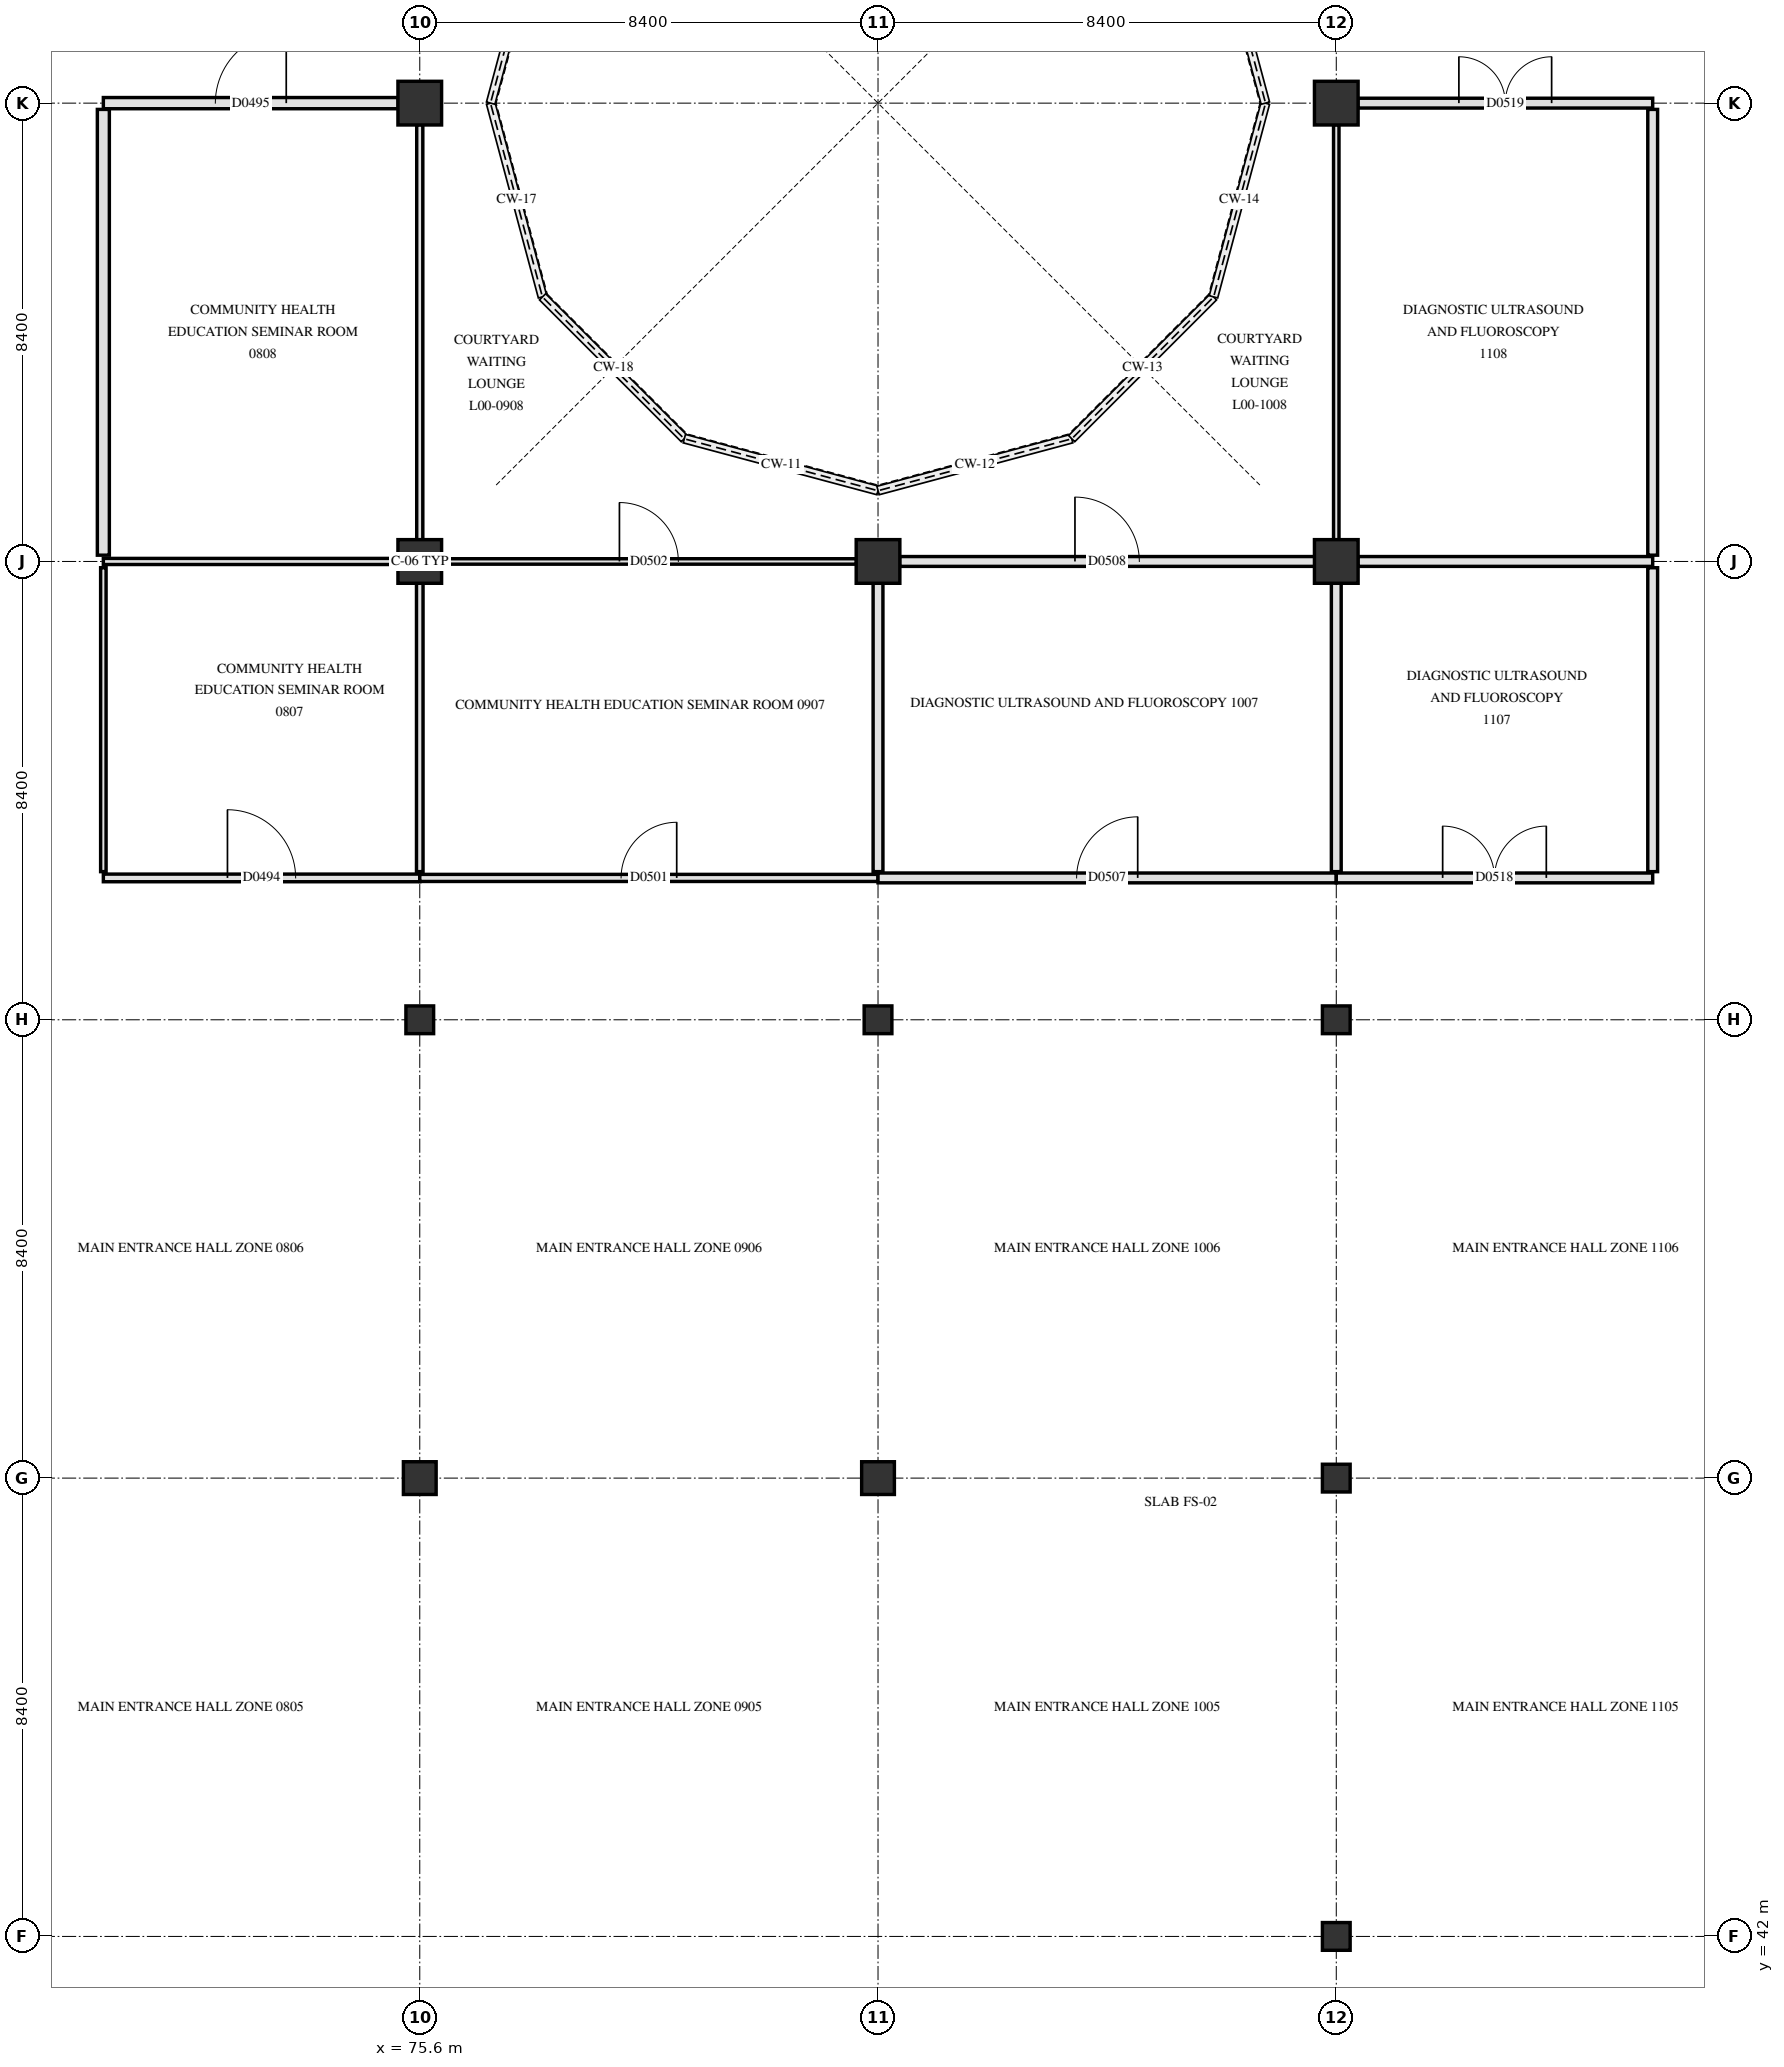
"""IFC4 building model, lengths in metres.
Left out: names, types, materials, properties, quantities, classifications, styles, units other than length and angle.
Written with IfcOpenShell. Run it as: python <this file> out.ifc"""

import sys

from ifc_helpers import new_model, si_unit, direction, frame, frame_2d, origin, origin_2d, place, context, subcontext, project, spatial, rectangle, circle, hollow_circle, extrude, element, fill, save


model = new_model("IFC4")
c1 = context("Model", 3, precision=1e-05, world=origin(), true_north=direction((0.0, 1.0)))
c2 = subcontext(c1, "Body", "Model", "MODEL_VIEW")
j1 = project(units=[si_unit("LENGTHUNIT", "METRE"), si_unit("PLANEANGLEUNIT", "RADIAN")], contexts=[c1])
p1 = place(None, origin())
s1 = spatial("IfcSite", under=j1, at=p1, CompositionType="ELEMENT")
p2 = place(p1, origin())
s2 = spatial("IfcBuilding", under=s1, at=p2, CompositionType="ELEMENT")
p3 = place(p2, origin())
s3 = spatial("IfcBuildingStorey", under=s2, at=p3, CompositionType="ELEMENT", Elevation=0.0)
p4 = place(p3, frame((75.6, 50.4, 0.0), z_axis=(0.0, 0.0, 1.0), x_axis=(1.0, 0.0, 0.0)))
e1 = element("IfcColumn", 1, at=p4, inside=s3, PredefinedType="COLUMN", context=c2, shape_type="SweptSolid", body=[
    extrude(rectangle(XDim=0.6, YDim=0.6, at=origin_2d()), origin(), (0.0, 0.0, 1.0), 4.8),
])
p5 = place(p3, frame((75.6, 58.8, 0.0), z_axis=(0.0, 0.0, 1.0), x_axis=(1.0, 0.0, 0.0)))
e2 = element("IfcColumn", 2, at=p5, inside=s3, PredefinedType="COLUMN", context=c2, shape_type="SweptSolid", body=[
    extrude(hollow_circle(Radius=0.254, WallThickness=0.02, at=origin_2d()), origin(), (0.0, 0.0, 1.0), 4.8),
])
for number, where, z_axis, x_axis in (
    (3, (75.6, 67.2, 0.0), (0.0, 0.0, 1.0), (1.0, 0.0, 0.0)),
    (4, (75.6, 75.6, 0.0), (0.0, 0.0, 1.0), (1.0, 0.0, 0.0)),
):
    element("IfcColumn", number, at=place(p3, frame(where, z_axis=z_axis, x_axis=x_axis)), inside=s3, PredefinedType="COLUMN", context=c2, shape_type="SweptSolid", body=[
        extrude(circle(Radius=0.4, at=origin_2d()), origin(), (0.0, 0.0, 1.0), 4.8),
    ])
p6 = place(p3, frame((84.0, 50.4, 0.0), z_axis=(0.0, 0.0, 1.0), x_axis=(1.0, 0.0, 0.0)))
e5 = element("IfcColumn", 5, at=p6, inside=s3, PredefinedType="COLUMN", context=c2, shape_type="SweptSolid", body=[
    extrude(rectangle(XDim=0.6, YDim=0.6, at=origin_2d()), origin(), (0.0, 0.0, 1.0), 4.8),
])
p7 = place(p3, frame((84.0, 58.8, 0.0), z_axis=(0.0, 0.0, 1.0), x_axis=(1.0, 0.0, 0.0)))
e6 = element("IfcColumn", 6, at=p7, inside=s3, PredefinedType="COLUMN", context=c2, shape_type="SweptSolid", body=[
    extrude(hollow_circle(Radius=0.254, WallThickness=0.02, at=origin_2d()), origin(), (0.0, 0.0, 1.0), 4.8),
])
p8 = place(p3, frame((84.0, 67.2, 0.0), z_axis=(0.0, 0.0, 1.0), x_axis=(1.0, 0.0, 0.0)))
e7 = element("IfcColumn", 7, at=p8, inside=s3, PredefinedType="COLUMN", context=c2, shape_type="SweptSolid", body=[
    extrude(circle(Radius=0.4, at=origin_2d()), origin(), (0.0, 0.0, 1.0), 4.8),
])
for number, where, z_axis, x_axis in (
    (8, (92.4, 42.0, 0.0), (0.0, 0.0, 1.0), (1.0, 0.0, 0.0)),
    (9, (92.4, 50.4, 0.0), (0.0, 0.0, 1.0), (1.0, 0.0, 0.0)),
    (10, (92.4, 58.8, 0.0), (0.0, 0.0, 1.0), (1.0, 0.0, 0.0)),
):
    element("IfcColumn", number, at=place(p3, frame(where, z_axis=z_axis, x_axis=x_axis)), inside=s3, PredefinedType="COLUMN", context=c2, shape_type="SweptSolid", body=[
        extrude(hollow_circle(Radius=0.254, WallThickness=0.02, at=origin_2d()), origin(), (0.0, 0.0, 1.0), 4.8),
    ])
for number, where, z_axis, x_axis in (
    (11, (92.4, 67.2, 0.0), (0.0, 0.0, 1.0), (1.0, 0.0, 0.0)),
    (12, (92.4, 75.6, 0.0), (0.0, 0.0, 1.0), (1.0, 0.0, 0.0)),
):
    element("IfcColumn", number, at=place(p3, frame(where, z_axis=z_axis, x_axis=x_axis)), inside=s3, PredefinedType="COLUMN", context=c2, shape_type="SweptSolid", body=[
        extrude(circle(Radius=0.4, at=origin_2d()), origin(), (0.0, 0.0, 1.0), 4.8),
    ])
p9 = place(p3, frame((69.8, 61.4, 0.0), z_axis=(0.0, 0.0, 1.0), x_axis=(1.0, 0.0, 0.0)))
e13 = element("IfcWall", 13, at=p9, inside=s3, PredefinedType="PARTITIONING", context=c2, shape_type="SweptSolid", body=[
    extrude(rectangle(XDim=5.8, YDim=0.14, at=frame_2d((2.9, 0.0))), origin(), (0.0, 0.0, 1.0), 3.89),
])
p10 = place(p9, frame((2.275, 0.0, 0.0)))
e14 = element("IfcOpeningElement", 14, at=p10, cuts=e13, PredefinedType="OPENING", context=c2, shape_type="SweptSolid", body=[
    extrude(rectangle(XDim=1.25, YDim=2.2, at=frame_2d((0.625, 1.1))), frame((0.0, 0.08, 0.0), z_axis=(0.0, -1.0, 0.0), x_axis=(1.0, 0.0, 0.0)), (0.0, 0.0, 1.0), 0.16),
])
p11 = place(p3, frame((75.6, 61.4, 0.0), z_axis=(0.0, 0.0, 1.0), x_axis=(1.0, 0.0, 0.0)))
e15 = element("IfcWall", 15, at=p11, inside=s3, PredefinedType="PARTITIONING", context=c2, shape_type="SweptSolid", body=[
    extrude(rectangle(XDim=8.4, YDim=0.13, at=frame_2d((4.2, 0.0))), origin(), (0.0, 0.0, 1.0), 3.89),
])
p12 = place(p11, frame((3.69, 0.0, 0.0)))
e16 = element("IfcOpeningElement", 16, at=p12, cuts=e15, PredefinedType="OPENING", context=c2, shape_type="SweptSolid", body=[
    extrude(rectangle(XDim=1.02, YDim=2.12, at=frame_2d((0.51, 1.06))), frame((0.0, 0.075, 0.0), z_axis=(0.0, -1.0, 0.0), x_axis=(1.0, 0.0, 0.0)), (0.0, 0.0, 1.0), 0.15),
])
p13 = place(p3, frame((84.0, 61.4, 0.0), z_axis=(0.0, 0.0, 1.0), x_axis=(1.0, 0.0, 0.0)))
e17 = element("IfcWall", 17, at=p13, inside=s3, PredefinedType="PARTITIONING", context=c2, shape_type="SweptSolid", body=[
    extrude(rectangle(XDim=8.4, YDim=0.18, at=frame_2d((4.2, 0.0))), origin(), (0.0, 0.0, 1.0), 3.89),
])
p14 = place(p13, frame((3.64, 0.0, 0.0)))
e18 = element("IfcOpeningElement", 18, at=p14, cuts=e17, PredefinedType="OPENING", context=c2, shape_type="SweptSolid", body=[
    extrude(rectangle(XDim=1.12, YDim=2.18, at=frame_2d((0.56, 1.09))), frame((0.0, 0.1, 0.0), z_axis=(0.0, -1.0, 0.0), x_axis=(1.0, 0.0, 0.0)), (0.0, 0.0, 1.0), 0.2),
])
p15 = place(p3, frame((92.4, 61.4, 0.0), z_axis=(0.0, 0.0, 1.0), x_axis=(1.0, 0.0, 0.0)))
e19 = element("IfcWall", 19, at=p15, inside=s3, PredefinedType="PARTITIONING", context=c2, shape_type="SweptSolid", body=[
    extrude(rectangle(XDim=5.8, YDim=0.18, at=frame_2d((2.9, 0.0))), origin(), (0.0, 0.0, 1.0), 3.89),
])
p16 = place(p15, frame((1.95, 0.0, 0.0)))
e20 = element("IfcOpeningElement", 20, at=p16, cuts=e19, PredefinedType="OPENING", context=c2, shape_type="SweptSolid", body=[
    extrude(rectangle(XDim=1.9, YDim=2.3, at=frame_2d((0.95, 1.15))), frame((0.0, 0.1, 0.0), z_axis=(0.0, -1.0, 0.0), x_axis=(1.0, 0.0, 0.0)), (0.0, 0.0, 1.0), 0.2),
])
p17 = place(p3, frame((69.8, 67.2, 0.0), z_axis=(0.0, 0.0, 1.0), x_axis=(1.0, 0.0, 0.0)))
e21 = element("IfcWall", 21, at=p17, inside=s3, PredefinedType="PARTITIONING", context=c2, shape_type="SweptSolid", body=[
    extrude(rectangle(XDim=5.405, YDim=0.112, at=frame_2d((2.703, 0.0))), origin(), (0.0, 0.0, 1.0), 3.84),
])
p18 = place(p3, frame((75.995, 67.2, 0.0), z_axis=(0.0, 0.0, 1.0), x_axis=(1.0, 0.0, 0.0)))
e22 = element("IfcWall", 22, at=p18, inside=s3, PredefinedType="PARTITIONING", context=c2, shape_type="SweptSolid", body=[
    extrude(rectangle(XDim=7.61, YDim=0.1, at=frame_2d((3.805, 0.0))), origin(), (0.0, 0.0, 1.0), 3.84),
])
p19 = place(p18, frame((3.265, 0.0, 0.0)))
e23 = element("IfcOpeningElement", 23, at=p19, cuts=e22, PredefinedType="OPENING", context=c2, shape_type="SweptSolid", body=[
    extrude(rectangle(XDim=1.08, YDim=2.12, at=frame_2d((0.54, 1.06))), frame((0.0, 0.06, 0.0), z_axis=(0.0, -1.0, 0.0), x_axis=(1.0, 0.0, 0.0)), (0.0, 0.0, 1.0), 0.12),
])
p20 = place(p3, frame((84.395, 67.2, 0.0), z_axis=(0.0, 0.0, 1.0), x_axis=(1.0, 0.0, 0.0)))
e24 = element("IfcWall", 24, at=p20, inside=s3, PredefinedType="PARTITIONING", context=c2, shape_type="SweptSolid", body=[
    extrude(rectangle(XDim=7.61, YDim=0.18, at=frame_2d((3.805, 0.0))), origin(), (0.0, 0.0, 1.0), 3.84),
])
p21 = place(p20, frame((3.215, 0.0, 0.0)))
e25 = element("IfcOpeningElement", 25, at=p21, cuts=e24, PredefinedType="OPENING", context=c2, shape_type="SweptSolid", body=[
    extrude(rectangle(XDim=1.18, YDim=2.18, at=frame_2d((0.59, 1.09))), frame((0.0, 0.1, 0.0), z_axis=(0.0, -1.0, 0.0), x_axis=(1.0, 0.0, 0.0)), (0.0, 0.0, 1.0), 0.2),
])
p22 = place(p3, frame((92.795, 67.2, 0.0), z_axis=(0.0, 0.0, 1.0), x_axis=(1.0, 0.0, 0.0)))
e26 = element("IfcWall", 26, at=p22, inside=s3, PredefinedType="PARTITIONING", context=c2, shape_type="SweptSolid", body=[
    extrude(rectangle(XDim=5.405, YDim=0.18, at=frame_2d((2.703, 0.0))), origin(), (0.0, 0.0, 1.0), 3.84),
])
p23 = place(p3, frame((69.8, 75.6, 0.0), z_axis=(0.0, 0.0, 1.0), x_axis=(1.0, 0.0, 0.0)))
e27 = element("IfcWall", 27, at=p23, inside=s3, PredefinedType="PARTITIONING", context=c2, shape_type="SweptSolid", body=[
    extrude(rectangle(XDim=5.405, YDim=0.205, at=frame_2d((2.703, 0.0))), origin(), (0.0, 0.0, 1.0), 3.84),
])
p24 = place(p23, frame((2.052, 0.0, 0.0)))
e28 = element("IfcOpeningElement", 28, at=p24, cuts=e27, PredefinedType="OPENING", context=c2, shape_type="SweptSolid", body=[
    extrude(rectangle(XDim=1.3, YDim=2.2, at=frame_2d((0.65, 1.1))), frame((0.0, 0.113, 0.0), z_axis=(0.0, -1.0, 0.0), x_axis=(1.0, 0.0, 0.0)), (0.0, 0.0, 1.0), 0.225),
])
p25 = place(p3, frame((92.795, 75.6, 0.0), z_axis=(0.0, 0.0, 1.0), x_axis=(1.0, 0.0, 0.0)))
e29 = element("IfcWall", 29, at=p25, inside=s3, PredefinedType="PARTITIONING", context=c2, shape_type="SweptSolid", body=[
    extrude(rectangle(XDim=5.405, YDim=0.18, at=frame_2d((2.703, 0.0))), origin(), (0.0, 0.0, 1.0), 3.84),
])
p26 = place(p25, frame((1.853, 0.0, 0.0)))
e30 = element("IfcOpeningElement", 30, at=p26, cuts=e29, PredefinedType="OPENING", context=c2, shape_type="SweptSolid", body=[
    extrude(rectangle(XDim=1.7, YDim=2.25, at=frame_2d((0.85, 1.125))), frame((0.0, 0.1, 0.0), z_axis=(0.0, -1.0, 0.0), x_axis=(1.0, 0.0, 0.0)), (0.0, 0.0, 1.0), 0.2),
])
p27 = place(p3, frame((69.8, 61.515, 0.0), z_axis=(0.0, 0.0, 1.0), x_axis=(0.0, 1.0, 0.0)))
e31 = element("IfcWall", 31, at=p27, inside=s3, PredefinedType="PARTITIONING", context=c2, shape_type="SweptSolid", body=[
    extrude(rectangle(XDim=5.57, YDim=0.1, at=frame_2d((2.785, 0.0))), origin(), (0.0, 0.0, 1.0), 3.84),
])
p28 = place(p3, frame((69.8, 67.315, 0.0), z_axis=(0.0, 0.0, 1.0), x_axis=(0.0, 1.0, 0.0)))
e32 = element("IfcWall", 32, at=p28, inside=s3, PredefinedType="PARTITIONING", context=c2, shape_type="SweptSolid", body=[
    extrude(rectangle(XDim=8.17, YDim=0.22, at=frame_2d((4.085, 0.0))), origin(), (0.0, 0.0, 1.0), 3.84),
])
p29 = place(p3, frame((75.6, 61.515, 0.0), z_axis=(0.0, 0.0, 1.0), x_axis=(0.0, 1.0, 0.0)))
e33 = element("IfcWall", 33, at=p29, inside=s3, PredefinedType="PARTITIONING", context=c2, shape_type="SweptSolid", body=[
    extrude(rectangle(XDim=5.29, YDim=0.12, at=frame_2d((2.645, 0.0))), origin(), (0.0, 0.0, 1.0), 3.89),
])
p30 = place(p3, frame((75.6, 67.595, 0.0), z_axis=(0.0, 0.0, 1.0), x_axis=(0.0, 1.0, 0.0)))
e34 = element("IfcWall", 34, at=p30, inside=s3, PredefinedType="PARTITIONING", context=c2, shape_type="SweptSolid", body=[
    extrude(rectangle(XDim=7.61, YDim=0.112, at=frame_2d((3.805, 0.0))), origin(), (0.0, 0.0, 1.0), 3.89),
])
for number, where, z_axis, x_axis in (
    (35, (84.0, 61.515, 0.0), (0.0, 0.0, 1.0), (0.0, 1.0, 0.0)),
    (36, (92.4, 61.515, 0.0), (0.0, 0.0, 1.0), (0.0, 1.0, 0.0)),
):
    element("IfcWall", number, at=place(p3, frame(where, z_axis=z_axis, x_axis=x_axis)), inside=s3, PredefinedType="PARTITIONING", context=c2, shape_type="SweptSolid", body=[
        extrude(rectangle(XDim=5.29, YDim=0.18, at=frame_2d((2.645, 0.0))), origin(), (0.0, 0.0, 1.0), 3.89),
    ])
p31 = place(p3, frame((92.4, 67.595, 0.0), z_axis=(0.0, 0.0, 1.0), x_axis=(0.0, 1.0, 0.0)))
e37 = element("IfcWall", 37, at=p31, inside=s3, PredefinedType="PARTITIONING", context=c2, shape_type="SweptSolid", body=[
    extrude(rectangle(XDim=7.61, YDim=0.1, at=frame_2d((3.805, 0.0))), origin(), (0.0, 0.0, 1.0), 3.89),
])
p32 = place(p3, frame((98.2, 61.515, 0.0), z_axis=(0.0, 0.0, 1.0), x_axis=(0.0, 1.0, 0.0)))
e38 = element("IfcWall", 38, at=p32, inside=s3, PredefinedType="PARTITIONING", context=c2, shape_type="SweptSolid", body=[
    extrude(rectangle(XDim=5.57, YDim=0.18, at=frame_2d((2.785, 0.0))), origin(), (0.0, 0.0, 1.0), 3.84),
])
p33 = place(p3, frame((98.2, 67.315, 0.0), z_axis=(0.0, 0.0, 1.0), x_axis=(0.0, 1.0, 0.0)))
e39 = element("IfcWall", 39, at=p33, inside=s3, PredefinedType="PARTITIONING", context=c2, shape_type="SweptSolid", body=[
    extrude(rectangle(XDim=8.17, YDim=0.18, at=frame_2d((4.085, 0.0))), origin(), (0.0, 0.0, 1.0), 3.84),
])
p34 = place(p10, origin())
e40 = element("IfcDoor", 40, at=p34, inside=s3, OperationType="SINGLE_SWING_LEFT", PredefinedType="DOOR", context=c2, shape_type="SweptSolid", body=[
    extrude(rectangle(XDim=1.25, YDim=2.2, at=frame_2d((0.625, 1.1))), frame((0.0, 0.025, 0.0), z_axis=(0.0, -1.0, 0.0), x_axis=(1.0, 0.0, 0.0)), (0.0, 0.0, 1.0), 0.05),
])
fill(e14, e40)
p35 = place(p24, origin())
e41 = element("IfcDoor", 41, at=p35, inside=s3, OperationType="SINGLE_SWING_RIGHT", PredefinedType="DOOR", context=c2, shape_type="SweptSolid", body=[
    extrude(rectangle(XDim=1.3, YDim=2.2, at=frame_2d((0.65, 1.1))), frame((0.0, 0.025, 0.0), z_axis=(0.0, -1.0, 0.0), x_axis=(1.0, 0.0, 0.0)), (0.0, 0.0, 1.0), 0.05),
])
fill(e28, e41)
p36 = place(p12, origin())
e42 = element("IfcDoor", 42, at=p36, inside=s3, OperationType="SINGLE_SWING_RIGHT", PredefinedType="DOOR", context=c2, shape_type="SweptSolid", body=[
    extrude(rectangle(XDim=1.02, YDim=2.12, at=frame_2d((0.51, 1.06))), frame((0.0, 0.025, 0.0), z_axis=(0.0, -1.0, 0.0), x_axis=(1.0, 0.0, 0.0)), (0.0, 0.0, 1.0), 0.05),
])
fill(e16, e42)
p37 = place(p19, origin())
e43 = element("IfcDoor", 43, at=p37, inside=s3, OperationType="SINGLE_SWING_LEFT", PredefinedType="DOOR", context=c2, shape_type="SweptSolid", body=[
    extrude(rectangle(XDim=1.08, YDim=2.12, at=frame_2d((0.54, 1.06))), frame((0.0, 0.025, 0.0), z_axis=(0.0, -1.0, 0.0), x_axis=(1.0, 0.0, 0.0)), (0.0, 0.0, 1.0), 0.05),
])
fill(e23, e43)
p38 = place(p14, origin())
e44 = element("IfcDoor", 44, at=p38, inside=s3, OperationType="SINGLE_SWING_RIGHT", PredefinedType="DOOR", context=c2, shape_type="SweptSolid", body=[
    extrude(rectangle(XDim=1.12, YDim=2.18, at=frame_2d((0.56, 1.09))), frame((0.0, 0.025, 0.0), z_axis=(0.0, -1.0, 0.0), x_axis=(1.0, 0.0, 0.0)), (0.0, 0.0, 1.0), 0.05),
])
fill(e18, e44)
p39 = place(p21, origin())
e45 = element("IfcDoor", 45, at=p39, inside=s3, OperationType="SINGLE_SWING_LEFT", PredefinedType="DOOR", context=c2, shape_type="SweptSolid", body=[
    extrude(rectangle(XDim=1.18, YDim=2.18, at=frame_2d((0.59, 1.09))), frame((0.0, 0.025, 0.0), z_axis=(0.0, -1.0, 0.0), x_axis=(1.0, 0.0, 0.0)), (0.0, 0.0, 1.0), 0.05),
])
fill(e25, e45)
p40 = place(p16, origin())
e46 = element("IfcDoor", 46, at=p40, inside=s3, OperationType="DOUBLE_SWING_LEFT", PredefinedType="DOOR", context=c2, shape_type="SweptSolid", body=[
    extrude(rectangle(XDim=1.9, YDim=2.3, at=frame_2d((0.95, 1.15))), frame((0.0, 0.025, 0.0), z_axis=(0.0, -1.0, 0.0), x_axis=(1.0, 0.0, 0.0)), (0.0, 0.0, 1.0), 0.05),
])
fill(e20, e46)
p41 = place(p26, origin())
e47 = element("IfcDoor", 47, at=p41, inside=s3, OperationType="DOUBLE_SWING_RIGHT", PredefinedType="DOOR", context=c2, shape_type="SweptSolid", body=[
    extrude(rectangle(XDim=1.7, YDim=2.25, at=frame_2d((0.85, 1.125))), frame((0.0, 0.025, 0.0), z_axis=(0.0, -1.0, 0.0), x_axis=(1.0, 0.0, 0.0)), (0.0, 0.0, 1.0), 0.05),
])
fill(e30, e47)
save(model, sys.argv[1])
